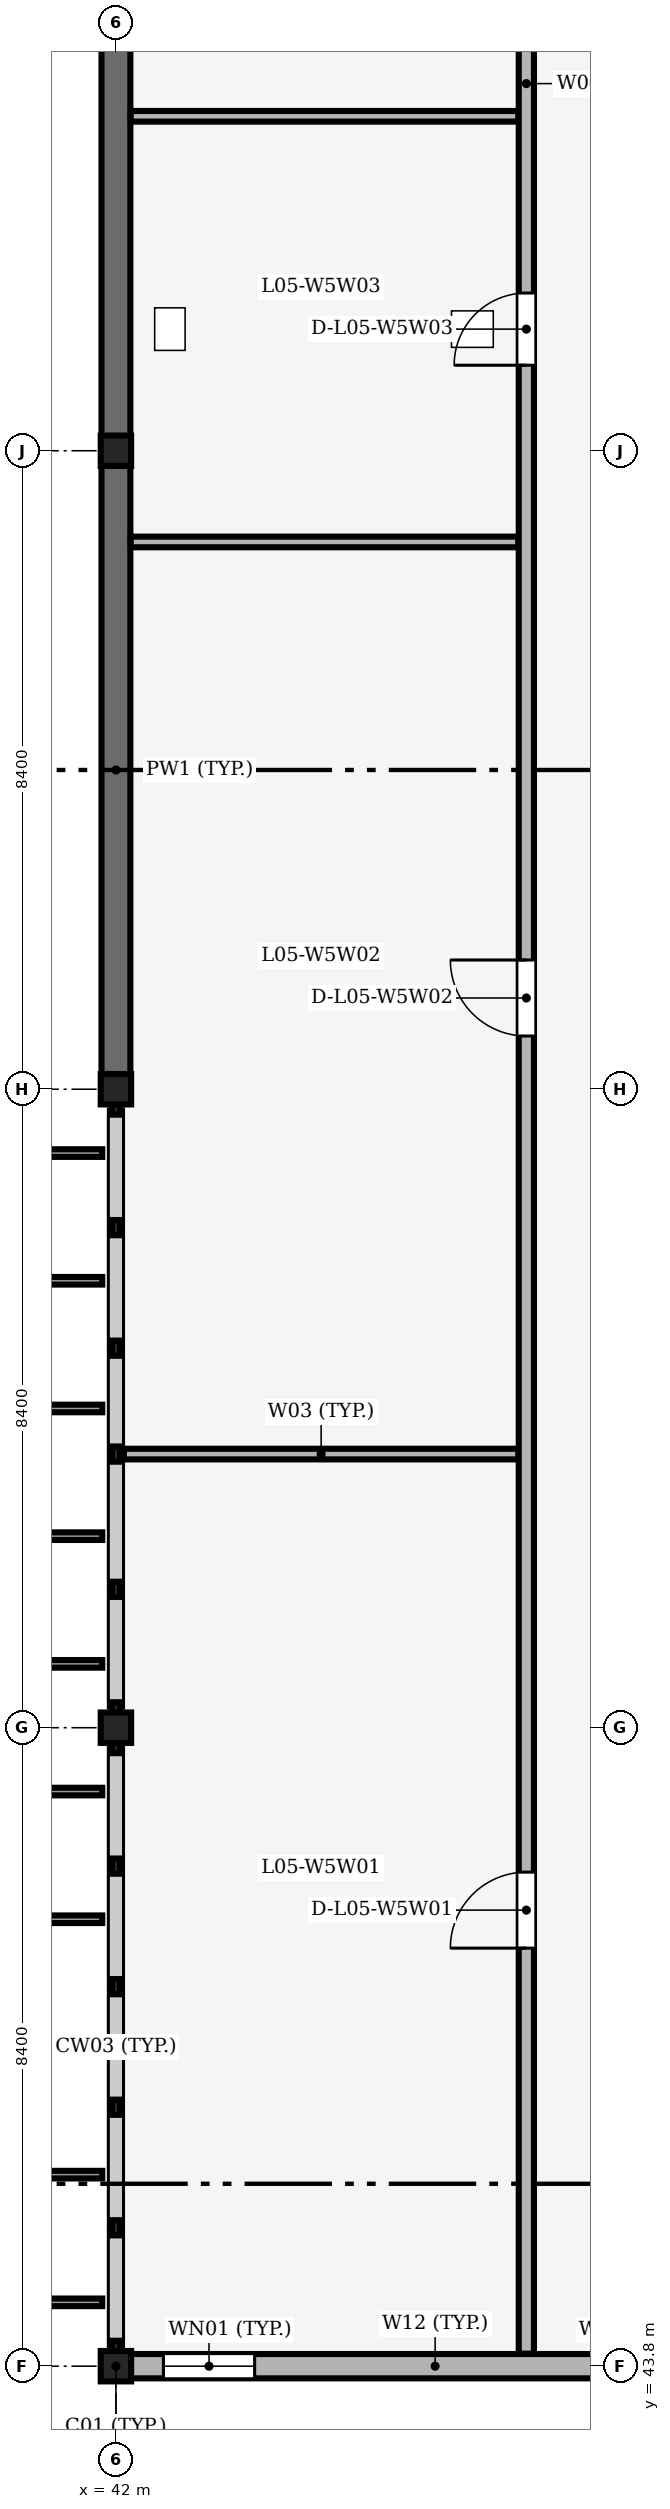
"""IFC4 building model, lengths in metres.
Left out: names, types, materials, properties, quantities, classifications, styles, units other than length and angle.
Written with IfcOpenShell. Run it as: python <this file> out.ifc"""

import sys

from ifc_helpers import new_model, si_unit, direction, frame, frame_2d, origin, origin_2d, place, context, subcontext, project, spatial, rectangle, extrude, element, fill, save


model = new_model("IFC4")
c1 = context("Model", 3, precision=1e-05, world=origin(), true_north=direction((0.0, 1.0)))
c2 = subcontext(c1, "Body", "Model", "MODEL_VIEW")
j1 = project(units=[si_unit("LENGTHUNIT", "METRE"), si_unit("PLANEANGLEUNIT", "RADIAN")], contexts=[c1])
p1 = place(None, origin())
s1 = spatial("IfcSite", under=j1, at=p1, CompositionType="ELEMENT")
p2 = place(p1, origin())
s2 = spatial("IfcBuilding", under=s1, at=p2, CompositionType="ELEMENT")
p3 = place(p2, frame((0.0, 0.0, 21.6)))
s3 = spatial("IfcBuildingStorey", under=s2, at=p3, CompositionType="ELEMENT", Elevation=21.6)
for number, where, z_axis, x_axis in (
    (1, (42.0, 43.8, 0.0), (0.0, 0.0, 1.0), (1.0, 0.0, 0.0)),
    (2, (42.0, 52.2, 0.0), (0.0, 0.0, 1.0), (1.0, 0.0, 0.0)),
    (3, (42.0, 60.6, 0.0), (0.0, 0.0, 1.0), (1.0, 0.0, 0.0)),
    (4, (42.0, 69.0, 0.0), (0.0, 0.0, 1.0), (1.0, 0.0, 0.0)),
):
    element("IfcColumn", number, at=place(p3, frame(where, z_axis=z_axis, x_axis=x_axis)), inside=s3, PredefinedType="COLUMN", context=c2, shape_type="SweptSolid", body=[
        extrude(rectangle(XDim=0.4, YDim=0.4, at=origin_2d()), origin(), (0.0, 0.0, 1.0), 4.2),
    ])
p4 = place(p3, frame((42.175, 43.8, 0.0), z_axis=(0.0, 0.0, 1.0), x_axis=(1.0, 0.0, 0.0)))
e5 = element("IfcWall", 5, at=p4, inside=s3, PredefinedType="SOLIDWALL", context=c2, shape_type="SweptSolid", body=[
    extrude(rectangle(XDim=8.05, YDim=0.32, at=frame_2d((4.025, 0.0))), origin(), (0.0, 0.0, 1.0), 3.48),
])
p5 = place(p4, frame((0.45, 0.0, 0.9)))
e6 = element("IfcOpeningElement", 6, at=p5, cuts=e5, PredefinedType="OPENING", context=c2, shape_type="SweptSolid", body=[
    extrude(rectangle(XDim=1.2, YDim=1.5, at=frame_2d((0.6, 0.75))), frame((0.0, 0.17, 0.0), z_axis=(0.0, -1.0, 0.0), x_axis=(1.0, 0.0, 0.0)), (0.0, 0.0, 1.0), 0.34),
])
p6 = place(p4, frame((6.4, 0.0, 0.9)))
e7 = element("IfcOpeningElement", 7, at=p6, cuts=e5, PredefinedType="OPENING", context=c2, shape_type="SweptSolid", body=[
    extrude(rectangle(XDim=1.2, YDim=1.8, at=frame_2d((0.6, 0.9))), frame((0.0, 0.17, 0.0), z_axis=(0.0, -1.0, 0.0), x_axis=(1.0, 0.0, 0.0)), (0.0, 0.0, 1.0), 0.34),
])
p7 = place(p3, frame((42.0, 60.775, 0.0), z_axis=(0.0, 0.0, 1.0), x_axis=(0.0, 1.0, 0.0)))
e8 = element("IfcWall", 8, at=p7, inside=s3, PredefinedType="SHEAR", context=c2, shape_type="SweptSolid", body=[
    extrude(rectangle(XDim=8.05, YDim=0.38, at=frame_2d((4.025, 0.0))), origin(), (0.0, 0.0, 1.0), 3.48),
])
p8 = place(p3, frame((42.0, 69.175, 0.0), z_axis=(0.0, 0.0, 1.0), x_axis=(0.0, 1.0, 0.0)))
e9 = element("IfcWall", 9, at=p8, inside=s3, PredefinedType="SHEAR", context=c2, shape_type="SweptSolid", body=[
    extrude(rectangle(XDim=8.05, YDim=0.38, at=frame_2d((4.025, 0.0))), origin(), (0.0, 0.0, 1.0), 3.43),
])
p9 = place(p3, frame((42.105, 55.8, 0.0), z_axis=(0.0, 0.0, 1.0), x_axis=(1.0, 0.0, 0.0)))
e10 = element("IfcWall", 10, at=p9, inside=s3, PredefinedType="PARTITIONING", context=c2, shape_type="SweptSolid", body=[
    extrude(rectangle(XDim=5.19, YDim=0.14, at=frame_2d((2.595, 0.0))), origin(), (0.0, 0.0, 1.0), 3.9),
])
for number, where, z_axis, x_axis in (
    (11, (42.195, 67.8, 0.0), (0.0, 0.0, 1.0), (1.0, 0.0, 0.0)),
    (12, (42.195, 73.4, 0.0), (0.0, 0.0, 1.0), (1.0, 0.0, 0.0)),
):
    element("IfcWall", number, at=place(p3, frame(where, z_axis=z_axis, x_axis=x_axis)), inside=s3, PredefinedType="PARTITIONING", context=c2, shape_type="SweptSolid", body=[
        extrude(rectangle(XDim=5.1, YDim=0.14, at=frame_2d((2.55, 0.0))), origin(), (0.0, 0.0, 1.0), 3.9),
    ])
p10 = place(p3, frame((47.4, 43.965, 0.0), z_axis=(0.0, 0.0, 1.0), x_axis=(0.0, 1.0, 0.0)))
e13 = element("IfcWall", 13, at=p10, inside=s3, PredefinedType="PARTITIONING", context=c2, shape_type="SweptSolid", body=[
    extrude(rectangle(XDim=59.73, YDim=0.2, at=frame_2d((29.865, 0.0))), origin(), (0.0, 0.0, 1.0), 3.9),
])
p11 = place(p10, frame((5.335, 0.0, 0.0)))
e14 = element("IfcOpeningElement", 14, at=p11, cuts=e13, PredefinedType="OPENING", context=c2, shape_type="SweptSolid", body=[
    extrude(rectangle(XDim=1.0, YDim=2.15, at=frame_2d((0.5, 1.075))), frame((0.0, 0.11, 0.0), z_axis=(0.0, -1.0, 0.0), x_axis=(1.0, 0.0, 0.0)), (0.0, 0.0, 1.0), 0.22),
])
p12 = place(p10, frame((17.335, 0.0, 0.0)))
e15 = element("IfcOpeningElement", 15, at=p12, cuts=e13, PredefinedType="OPENING", context=c2, shape_type="SweptSolid", body=[
    extrude(rectangle(XDim=1.0, YDim=2.15, at=frame_2d((0.5, 1.075))), frame((0.0, 0.11, 0.0), z_axis=(0.0, -1.0, 0.0), x_axis=(1.0, 0.0, 0.0)), (0.0, 0.0, 1.0), 0.22),
])
p13 = place(p10, frame((26.16, 0.0, 0.0)))
e16 = element("IfcOpeningElement", 16, at=p13, cuts=e13, PredefinedType="OPENING", context=c2, shape_type="SweptSolid", body=[
    extrude(rectangle(XDim=0.95, YDim=2.2, at=frame_2d((0.475, 1.1))), frame((0.0, 0.11, 0.0), z_axis=(0.0, -1.0, 0.0), x_axis=(1.0, 0.0, 0.0)), (0.0, 0.0, 1.0), 0.22),
])
p14 = place(p10, frame((31.76, 0.0, 0.0)))
e17 = element("IfcOpeningElement", 17, at=p14, cuts=e13, PredefinedType="OPENING", context=c2, shape_type="SweptSolid", body=[
    extrude(rectangle(XDim=0.95, YDim=2.2, at=frame_2d((0.475, 1.1))), frame((0.0, 0.11, 0.0), z_axis=(0.0, -1.0, 0.0), x_axis=(1.0, 0.0, 0.0)), (0.0, 0.0, 1.0), 0.22),
])
p15 = place(p10, frame((37.36, 0.0, 0.0)))
e18 = element("IfcOpeningElement", 18, at=p15, cuts=e13, PredefinedType="OPENING", context=c2, shape_type="SweptSolid", body=[
    extrude(rectangle(XDim=0.95, YDim=2.1, at=frame_2d((0.475, 1.05))), frame((0.0, 0.11, 0.0), z_axis=(0.0, -1.0, 0.0), x_axis=(1.0, 0.0, 0.0)), (0.0, 0.0, 1.0), 0.22),
])
p16 = place(p10, frame((45.035, 0.0, 0.0)))
e19 = element("IfcOpeningElement", 19, at=p16, cuts=e13, PredefinedType="OPENING", context=c2, shape_type="SweptSolid", body=[
    extrude(rectangle(XDim=1.0, YDim=2.15, at=frame_2d((0.5, 1.075))), frame((0.0, 0.11, 0.0), z_axis=(0.0, -1.0, 0.0), x_axis=(1.0, 0.0, 0.0)), (0.0, 0.0, 1.0), 0.22),
])
p17 = place(p10, frame((54.635, 0.0, 0.0)))
e20 = element("IfcOpeningElement", 20, at=p17, cuts=e13, PredefinedType="OPENING", context=c2, shape_type="SweptSolid", body=[
    extrude(rectangle(XDim=1.0, YDim=2.15, at=frame_2d((0.5, 1.075))), frame((0.0, 0.11, 0.0), z_axis=(0.0, -1.0, 0.0), x_axis=(1.0, 0.0, 0.0)), (0.0, 0.0, 1.0), 0.22),
])
p18 = place(p5, origin())
e21 = element("IfcWindow", 21, at=p18, inside=s3, PartitioningType="SINGLE_PANEL", PredefinedType="WINDOW", context=c2, shape_type="SweptSolid", body=[
    extrude(rectangle(XDim=1.2, YDim=1.5, at=frame_2d((0.6, 0.75))), frame((0.0, 0.03, 0.0), z_axis=(0.0, -1.0, 0.0), x_axis=(1.0, 0.0, 0.0)), (0.0, 0.0, 1.0), 0.06),
])
fill(e6, e21)
p19 = place(p11, origin())
e22 = element("IfcDoor", 22, at=p19, inside=s3, OperationType="SINGLE_SWING_LEFT", PredefinedType="DOOR", context=c2, shape_type="SweptSolid", body=[
    extrude(rectangle(XDim=1.0, YDim=2.15, at=frame_2d((0.5, 1.075))), frame((0.0, 0.025, 0.0), z_axis=(0.0, -1.0, 0.0), x_axis=(1.0, 0.0, 0.0)), (0.0, 0.0, 1.0), 0.05),
])
fill(e14, e22)
p20 = place(p12, origin())
e23 = element("IfcDoor", 23, at=p20, inside=s3, OperationType="SINGLE_SWING_RIGHT", PredefinedType="DOOR", context=c2, shape_type="SweptSolid", body=[
    extrude(rectangle(XDim=1.0, YDim=2.15, at=frame_2d((0.5, 1.075))), frame((0.0, 0.025, 0.0), z_axis=(0.0, -1.0, 0.0), x_axis=(1.0, 0.0, 0.0)), (0.0, 0.0, 1.0), 0.05),
])
fill(e15, e23)
p21 = place(p13, origin())
e24 = element("IfcDoor", 24, at=p21, inside=s3, OperationType="SINGLE_SWING_LEFT", PredefinedType="DOOR", context=c2, shape_type="SweptSolid", body=[
    extrude(rectangle(XDim=0.95, YDim=2.2, at=frame_2d((0.475, 1.1))), frame((0.0, 0.025, 0.0), z_axis=(0.0, -1.0, 0.0), x_axis=(1.0, 0.0, 0.0)), (0.0, 0.0, 1.0), 0.05),
])
fill(e16, e24)
save(model, sys.argv[1])
